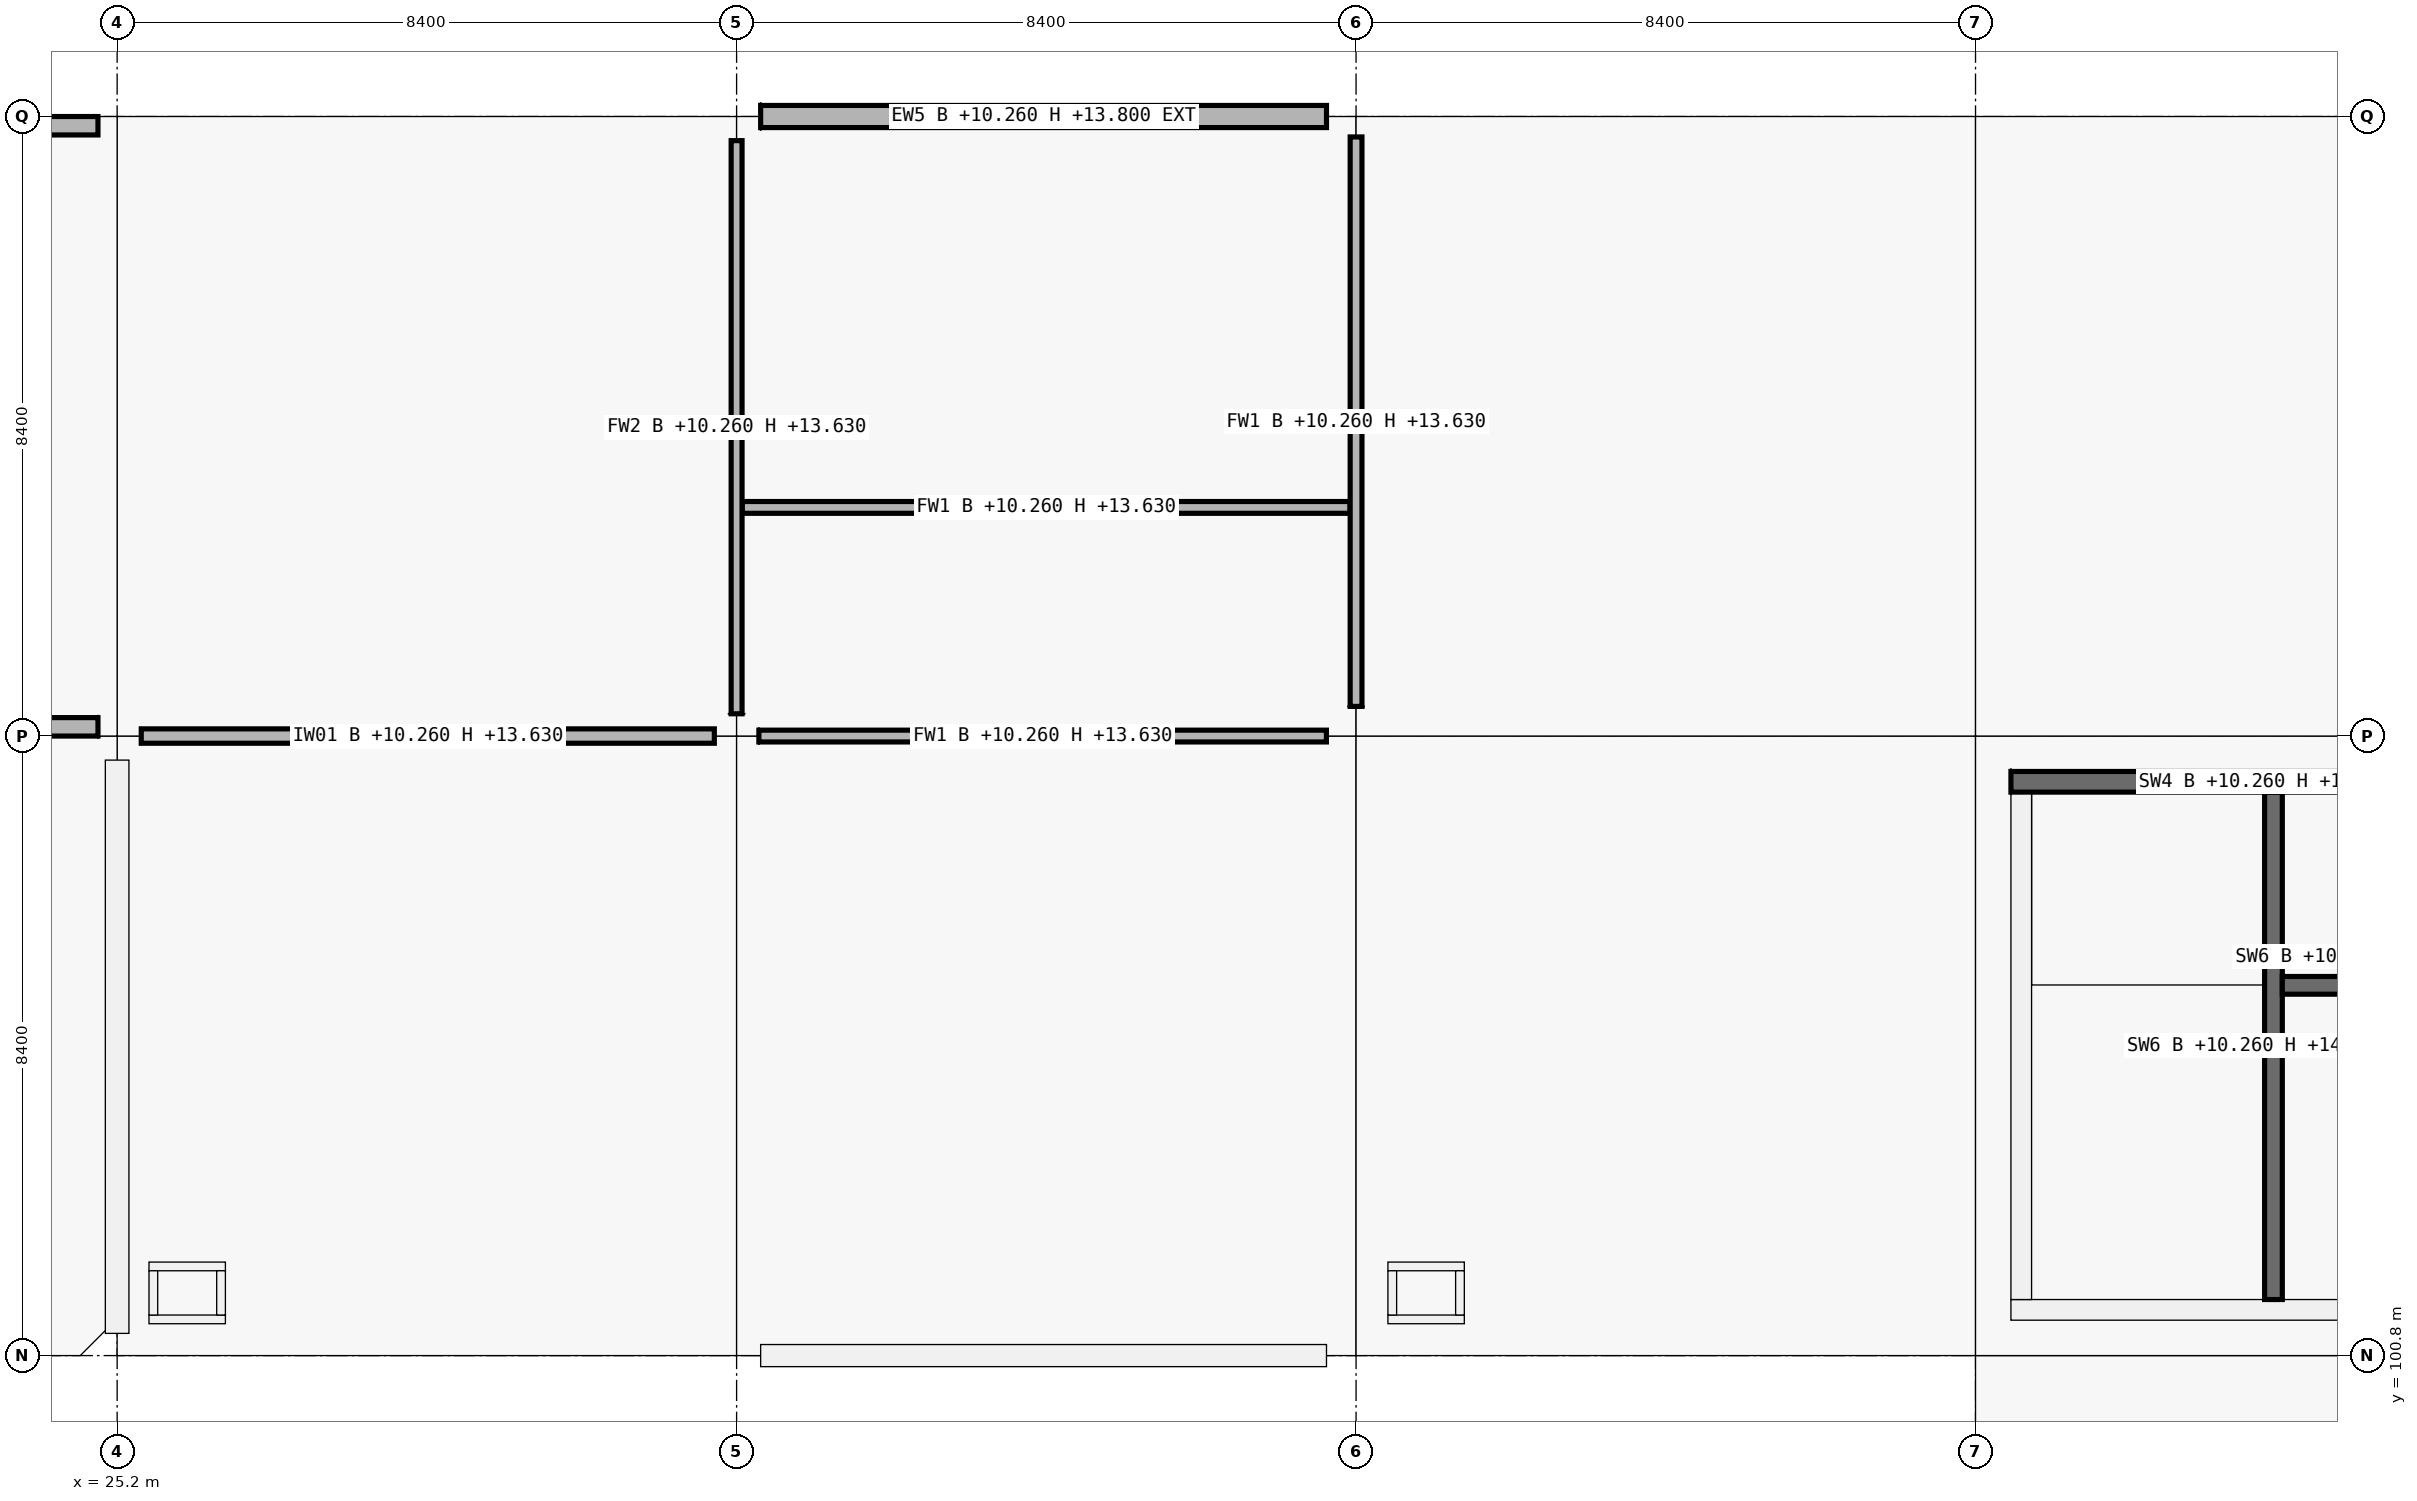
"""IFC4 building model, lengths in metres.
Left out: names, types, materials, properties, quantities, classifications, styles, units other than length and angle.
Written with IfcOpenShell. Run it as: python <this file> out.ifc"""

import sys

from ifc_helpers import new_model, si_unit, direction, frame, frame_2d, origin, origin_2d, place, context, subcontext, project, spatial, rectangle, extrude, element, fill, save


model = new_model("IFC4")
c1 = context("Model", 3, precision=1e-05, world=origin(), true_north=direction((0.0, 1.0)))
c2 = subcontext(c1, "Body", "Model", "MODEL_VIEW")
j1 = project(units=[si_unit("LENGTHUNIT", "METRE"), si_unit("PLANEANGLEUNIT", "RADIAN")], contexts=[c1])
p1 = place(None, origin())
s1 = spatial("IfcSite", under=j1, at=p1, CompositionType="ELEMENT")
p2 = place(p1, origin())
s2 = spatial("IfcBuilding", under=s1, at=p2, CompositionType="ELEMENT")
p3 = place(p2, frame((0.0, 0.0, 10.26)))
s3 = spatial("IfcBuildingStorey", under=s2, at=p3, CompositionType="ELEMENT", Elevation=10.26)
p4 = place(p3, frame((25.2, 100.8, 0.0), z_axis=(0.0, 0.0, 1.0), x_axis=(1.0, 0.0, 0.0)))
e1 = element("IfcColumn", 1, at=p4, inside=s3, PredefinedType="COLUMN", context=c2, shape_type="SweptSolid", body=[
    extrude(rectangle(XDim=0.6, YDim=0.6, at=origin_2d()), origin(), (0.0, 0.0, 1.0), 4.5),
])
p5 = place(p3, frame((25.2, 109.2, 0.0), z_axis=(0.0, 0.0, 1.0), x_axis=(1.0, 0.0, 0.0)))
e2 = element("IfcColumn", 2, at=p5, inside=s3, PredefinedType="COLUMN", context=c2, shape_type="SweptSolid", body=[
    extrude(rectangle(XDim=0.65, YDim=0.65, at=origin_2d()), origin(), (0.0, 0.0, 1.0), 4.5),
])
p6 = place(p3, frame((25.2, 117.6, 0.0), z_axis=(0.0, 0.0, 1.0), x_axis=(1.0, 0.0, 0.0)))
e3 = element("IfcColumn", 3, at=p6, inside=s3, PredefinedType="COLUMN", context=c2, shape_type="SweptSolid", body=[
    extrude(rectangle(XDim=0.6, YDim=0.6, at=origin_2d()), origin(), (0.0, 0.0, 1.0), 4.5),
])
p7 = place(p3, frame((33.6, 100.8, 0.0), z_axis=(0.0, 0.0, 1.0), x_axis=(1.0, 0.0, 0.0)))
e4 = element("IfcColumn", 4, at=p7, inside=s3, PredefinedType="COLUMN", context=c2, shape_type="SweptSolid", body=[
    extrude(rectangle(XDim=0.65, YDim=0.65, at=origin_2d()), origin(), (0.0, 0.0, 1.0), 4.5),
])
p8 = place(p3, frame((33.6, 109.2, 0.0), z_axis=(0.0, 0.0, 1.0), x_axis=(1.0, 0.0, 0.0)))
e5 = element("IfcColumn", 5, at=p8, inside=s3, PredefinedType="COLUMN", context=c2, shape_type="SweptSolid", body=[
    extrude(rectangle(XDim=0.6, YDim=0.6, at=origin_2d()), origin(), (0.0, 0.0, 1.0), 4.5),
])
p9 = place(p3, frame((33.6, 117.6, 0.0), z_axis=(0.0, 0.0, 1.0), x_axis=(1.0, 0.0, 0.0)))
e6 = element("IfcColumn", 6, at=p9, inside=s3, PredefinedType="COLUMN", context=c2, shape_type="SweptSolid", body=[
    extrude(rectangle(XDim=0.65, YDim=0.65, at=origin_2d()), origin(), (0.0, 0.0, 1.0), 4.5),
])
for number, where, z_axis, x_axis in (
    (7, (42.0, 100.8, 0.0), (0.0, 0.0, 1.0), (1.0, 0.0, 0.0)),
    (8, (42.0, 109.2, 0.0), (0.0, 0.0, 1.0), (1.0, 0.0, 0.0)),
):
    element("IfcColumn", number, at=place(p3, frame(where, z_axis=z_axis, x_axis=x_axis)), inside=s3, PredefinedType="COLUMN", context=c2, shape_type="SweptSolid", body=[
        extrude(rectangle(XDim=0.8, YDim=0.8, at=origin_2d()), origin(), (0.0, 0.0, 1.0), 4.5),
    ])
p10 = place(p3, frame((42.0, 117.6, 0.0), z_axis=(0.0, 0.0, 1.0), x_axis=(1.0, 0.0, 0.0)))
e9 = element("IfcColumn", 9, at=p10, inside=s3, PredefinedType="COLUMN", context=c2, shape_type="SweptSolid", body=[
    extrude(rectangle(XDim=0.8, YDim=0.55, at=origin_2d()), origin(), (0.0, 0.0, 1.0), 4.5),
])
for number, where, z_axis, x_axis in (
    (10, (50.4, 100.8, 0.0), (0.0, 0.0, 1.0), (1.0, 0.0, 0.0)),
    (11, (50.4, 109.2, 0.0), (0.0, 0.0, 1.0), (1.0, 0.0, 0.0)),
):
    element("IfcColumn", number, at=place(p3, frame(where, z_axis=z_axis, x_axis=x_axis)), inside=s3, PredefinedType="COLUMN", context=c2, shape_type="SweptSolid", body=[
        extrude(rectangle(XDim=0.85, YDim=0.85, at=origin_2d()), origin(), (0.0, 0.0, 1.0), 4.5),
    ])
p11 = place(p3, frame((50.4, 117.6, 0.0), z_axis=(0.0, 0.0, 1.0), x_axis=(1.0, 0.0, 0.0)))
e12 = element("IfcColumn", 12, at=p11, inside=s3, PredefinedType="COLUMN", context=c2, shape_type="SweptSolid", body=[
    extrude(rectangle(XDim=0.8, YDim=0.55, at=origin_2d()), origin(), (0.0, 0.0, 1.0), 4.5),
])
p12 = place(p3, frame((25.2, 101.101, 0.0), z_axis=(0.0, 0.0, 1.0), x_axis=(0.0, 1.0, 0.0)))
e13 = element("IfcWall", 13, at=p12, inside=s3, PredefinedType="SOLIDWALL", context=c2, shape_type="SweptSolid", body=[
    extrude(rectangle(XDim=7.773, YDim=0.32, at=frame_2d((3.886, 0.0))), origin(), (0.0, 0.0, 1.0), 3.54),
])
p13 = place(p12, frame((3.326, 0.0, 0.0)))
e14 = element("IfcOpeningElement", 14, at=p13, cuts=e13, PredefinedType="OPENING", context=c2, shape_type="SweptSolid", body=[
    extrude(rectangle(XDim=1.12, YDim=2.2, at=frame_2d((0.56, 1.1))), frame((0.0, 0.16, 0.0), z_axis=(0.0, -1.0, 0.0), x_axis=(1.0, 0.0, 0.0)), (0.0, 0.0, 1.0), 0.32),
])
p14 = place(p3, frame((41.599, 100.8, 0.0), z_axis=(0.0, 0.0, 1.0), x_axis=(-1.0, 0.0, 0.0)))
e15 = element("IfcWall", 15, at=p14, inside=s3, PredefinedType="SOLIDWALL", context=c2, shape_type="SweptSolid", body=[
    extrude(rectangle(XDim=7.673, YDim=0.3, at=frame_2d((3.836, 0.0))), origin(), (0.0, 0.0, 1.0), 3.54),
])
p15 = place(p14, frame((2.736, 0.0, 0.9)))
e16 = element("IfcOpeningElement", 16, at=p15, cuts=e15, PredefinedType="OPENING", context=c2, shape_type="SweptSolid", body=[
    extrude(rectangle(XDim=2.2, YDim=1.75, at=frame_2d((1.1, 0.875))), frame((0.0, 0.15, 0.0), z_axis=(0.0, -1.0, 0.0), x_axis=(1.0, 0.0, 0.0)), (0.0, 0.0, 1.0), 0.3),
])
p16 = place(p3, frame((33.926, 117.6, 0.0), z_axis=(0.0, 0.0, 1.0), x_axis=(1.0, 0.0, 0.0)))
e17 = element("IfcWall", 17, at=p16, inside=s3, PredefinedType="SOLIDWALL", context=c2, shape_type="SweptSolid", body=[
    extrude(rectangle(XDim=7.673, YDim=0.3, at=frame_2d((3.836, 0.0))), origin(), (0.0, 0.0, 1.0), 3.54),
])
p17 = place(p16, frame((2.437, 0.0, 0.9)))
e18 = element("IfcOpeningElement", 18, at=p17, cuts=e17, PredefinedType="OPENING", context=c2, shape_type="SweptSolid", body=[
    extrude(rectangle(XDim=2.8, YDim=1.75, at=frame_2d((1.4, 0.875))), frame((0.0, 0.15, 0.0), z_axis=(0.0, -1.0, 0.0), x_axis=(1.0, 0.0, 0.0)), (0.0, 0.0, 1.0), 0.3),
])
for number, where, z_axis, x_axis in (
    (19, (24.94, 109.325, 0.0), (0.0, 0.0, 1.0), (-1.0, 0.0, 0.0)),
    (20, (17.06, 117.475, 0.0), (0.0, 0.0, 1.0), (1.0, 0.0, 0.0)),
):
    element("IfcWall", number, at=place(p3, frame(where, z_axis=z_axis, x_axis=x_axis)), inside=s3, PredefinedType="PARAPET", context=c2, shape_type="SweptSolid", body=[
        extrude(rectangle(XDim=7.88, YDim=0.25, at=frame_2d((3.94, 0.0))), origin(), (0.0, 0.0, 1.0), 0.95),
    ])
p18 = place(p3, frame((58.32, 101.42, 0.0), z_axis=(0.0, 0.0, 1.0), x_axis=(-1.0, 0.0, 0.0)))
e21 = element("IfcWall", 21, at=p18, inside=s3, PredefinedType="SHEAR", context=c2, shape_type="SweptSolid", body=[
    extrude(rectangle(XDim=7.44, YDim=0.28, at=frame_2d((3.72, 0.0))), origin(), (0.0, 0.0, 1.0), 4.5),
])
p19 = place(p18, frame((1.28, 0.0, 0.0)))
e22 = element("IfcOpeningElement", 22, at=p19, cuts=e21, PredefinedType="OPENING", context=c2, shape_type="SweptSolid", body=[
    extrude(rectangle(XDim=1.5, YDim=2.15, at=frame_2d((0.75, 1.075))), frame((0.0, 0.14, 0.0), z_axis=(0.0, -1.0, 0.0), x_axis=(1.0, 0.0, 0.0)), (0.0, 0.0, 1.0), 0.28),
])
p20 = place(p3, frame((51.02, 101.56, 0.0), z_axis=(0.0, 0.0, 1.0), x_axis=(0.0, 1.0, 0.0)))
e23 = element("IfcWall", 23, at=p20, inside=s3, PredefinedType="SHEAR", context=c2, shape_type="SweptSolid", body=[
    extrude(rectangle(XDim=6.88, YDim=0.28, at=frame_2d((3.44, 0.0))), origin(), (0.0, 0.0, 1.0), 4.5),
])
p21 = place(p3, frame((50.88, 108.58, 0.0), z_axis=(0.0, 0.0, 1.0), x_axis=(1.0, 0.0, 0.0)))
e24 = element("IfcWall", 24, at=p21, inside=s3, PredefinedType="SHEAR", context=c2, shape_type="SweptSolid", body=[
    extrude(rectangle(XDim=7.44, YDim=0.28, at=frame_2d((3.72, 0.0))), origin(), (0.0, 0.0, 1.0), 4.5),
])
p22 = place(p3, frame((54.44, 101.56, 0.0), z_axis=(0.0, 0.0, 1.0), x_axis=(0.0, 1.0, 0.0)))
e25 = element("IfcWall", 25, at=p22, inside=s3, PredefinedType="SHEAR", context=c2, shape_type="SweptSolid", body=[
    extrude(rectangle(XDim=6.88, YDim=0.24, at=frame_2d((3.44, 0.0))), origin(), (0.0, 0.0, 1.0), 4.5),
])
p23 = place(p22, frame((0.12, 0.0, 0.0)))
e26 = element("IfcOpeningElement", 26, at=p23, cuts=e25, PredefinedType="OPENING", context=c2, shape_type="SweptSolid", body=[
    extrude(rectangle(XDim=1.0, YDim=2.15, at=frame_2d((0.5, 1.075))), frame((0.0, 0.12, 0.0), z_axis=(0.0, -1.0, 0.0), x_axis=(1.0, 0.0, 0.0)), (0.0, 0.0, 1.0), 0.24),
])
p24 = place(p3, frame((54.56, 105.82, 0.0), z_axis=(0.0, 0.0, 1.0), x_axis=(1.0, 0.0, 0.0)))
e27 = element("IfcWall", 27, at=p24, inside=s3, PredefinedType="SHEAR", context=c2, shape_type="SweptSolid", body=[
    extrude(rectangle(XDim=3.48, YDim=0.24, at=frame_2d((1.74, 0.0))), origin(), (0.0, 0.0, 1.0), 4.5),
])
p25 = place(p24, frame((1.14, 0.0, 0.0)))
e28 = element("IfcOpeningElement", 28, at=p25, cuts=e27, PredefinedType="OPENING", context=c2, shape_type="SweptSolid", body=[
    extrude(rectangle(XDim=1.2, YDim=2.2, at=frame_2d((0.6, 1.1))), frame((0.0, 0.12, 0.0), z_axis=(0.0, -1.0, 0.0), x_axis=(1.0, 0.0, 0.0)), (0.0, 0.0, 1.0), 0.24),
])
for number, where, z_axis, x_axis in (
    (29, (25.632, 101.291, 0.0), (0.0, 0.0, 1.0), (1.0, 0.0, 0.0)),
    (30, (25.632, 102.009, 0.0), (0.0, 0.0, 1.0), (1.0, 0.0, 0.0)),
):
    element("IfcWall", number, at=place(p3, frame(where, z_axis=z_axis, x_axis=x_axis)), inside=s3, PredefinedType="PARTITIONING", context=c2, shape_type="SweptSolid", body=[
        extrude(rectangle(XDim=1.036, YDim=0.118, at=frame_2d((0.518, 0.0))), origin(), (0.0, 0.0, 1.0), 3.53),
    ])
for number, where, z_axis, x_axis in (
    (31, (25.691, 101.35, 0.0), (0.0, 0.0, 1.0), (0.0, 1.0, 0.0)),
    (32, (26.609, 101.35, 0.0), (0.0, 0.0, 1.0), (0.0, 1.0, 0.0)),
):
    element("IfcWall", number, at=place(p3, frame(where, z_axis=z_axis, x_axis=x_axis)), inside=s3, PredefinedType="PARTITIONING", context=c2, shape_type="SweptSolid", body=[
        extrude(rectangle(XDim=0.6, YDim=0.118, at=frame_2d((0.3, 0.0))), origin(), (0.0, 0.0, 1.0), 3.53),
    ])
for number, where, z_axis, x_axis in (
    (33, (42.432, 101.291, 0.0), (0.0, 0.0, 1.0), (1.0, 0.0, 0.0)),
    (34, (42.432, 102.009, 0.0), (0.0, 0.0, 1.0), (1.0, 0.0, 0.0)),
):
    element("IfcWall", number, at=place(p3, frame(where, z_axis=z_axis, x_axis=x_axis)), inside=s3, PredefinedType="PARTITIONING", context=c2, shape_type="SweptSolid", body=[
        extrude(rectangle(XDim=1.036, YDim=0.118, at=frame_2d((0.518, 0.0))), origin(), (0.0, 0.0, 1.0), 3.53),
    ])
for number, where, z_axis, x_axis in (
    (35, (42.491, 101.35, 0.0), (0.0, 0.0, 1.0), (0.0, 1.0, 0.0)),
    (36, (43.409, 101.35, 0.0), (0.0, 0.0, 1.0), (0.0, 1.0, 0.0)),
):
    element("IfcWall", number, at=place(p3, frame(where, z_axis=z_axis, x_axis=x_axis)), inside=s3, PredefinedType="PARTITIONING", context=c2, shape_type="SweptSolid", body=[
        extrude(rectangle(XDim=0.6, YDim=0.118, at=frame_2d((0.3, 0.0))), origin(), (0.0, 0.0, 1.0), 3.53),
    ])
p26 = place(p3, frame((25.527, 109.2, 0.0), z_axis=(0.0, 0.0, 1.0), x_axis=(1.0, 0.0, 0.0)))
e37 = element("IfcWall", 37, at=p26, inside=s3, PredefinedType="PARTITIONING", context=c2, shape_type="SweptSolid", body=[
    extrude(rectangle(XDim=7.771, YDim=0.195, at=frame_2d((3.885, 0.0))), origin(), (0.0, 0.0, 1.0), 3.37),
])
p27 = place(p26, frame((3.375, 0.0, 0.0)))
e38 = element("IfcOpeningElement", 38, at=p27, cuts=e37, PredefinedType="OPENING", context=c2, shape_type="SweptSolid", body=[
    extrude(rectangle(XDim=1.02, YDim=2.2, at=frame_2d((0.51, 1.1))), frame((0.0, 0.098, 0.0), z_axis=(0.0, -1.0, 0.0), x_axis=(1.0, 0.0, 0.0)), (0.0, 0.0, 1.0), 0.195),
])
p28 = place(p3, frame((33.902, 109.2, 0.0), z_axis=(0.0, 0.0, 1.0), x_axis=(1.0, 0.0, 0.0)))
e39 = element("IfcWall", 39, at=p28, inside=s3, PredefinedType="PARTITIONING", context=c2, shape_type="SweptSolid", body=[
    extrude(rectangle(XDim=7.696, YDim=0.16, at=frame_2d((3.848, 0.0))), origin(), (0.0, 0.0, 1.0), 3.37),
])
p29 = place(p3, frame((33.6, 109.502, 0.0), z_axis=(0.0, 0.0, 1.0), x_axis=(0.0, 1.0, 0.0)))
e40 = element("IfcWall", 40, at=p29, inside=s3, PredefinedType="PARTITIONING", context=c2, shape_type="SweptSolid", body=[
    extrude(rectangle(XDim=7.771, YDim=0.148, at=frame_2d((3.885, 0.0))), origin(), (0.0, 0.0, 1.0), 3.37),
])
p30 = place(p3, frame((42.0, 109.602, 0.0), z_axis=(0.0, 0.0, 1.0), x_axis=(0.0, 1.0, 0.0)))
e41 = element("IfcWall", 41, at=p30, inside=s3, PredefinedType="PARTITIONING", context=c2, shape_type="SweptSolid", body=[
    extrude(rectangle(XDim=7.721, YDim=0.16, at=frame_2d((3.86, 0.0))), origin(), (0.0, 0.0, 1.0), 3.37),
])
p31 = place(p30, frame((0.763, 0.0, 0.0)))
e42 = element("IfcOpeningElement", 42, at=p31, cuts=e41, PredefinedType="OPENING", context=c2, shape_type="SweptSolid", body=[
    extrude(rectangle(XDim=1.05, YDim=2.15, at=frame_2d((0.525, 1.075))), frame((0.0, 0.08, 0.0), z_axis=(0.0, -1.0, 0.0), x_axis=(1.0, 0.0, 0.0)), (0.0, 0.0, 1.0), 0.16),
])
p32 = place(p30, frame((4.708, 0.0, 0.0)))
e43 = element("IfcOpeningElement", 43, at=p32, cuts=e41, PredefinedType="OPENING", context=c2, shape_type="SweptSolid", body=[
    extrude(rectangle(XDim=1.0, YDim=2.15, at=frame_2d((0.5, 1.075))), frame((0.0, 0.08, 0.0), z_axis=(0.0, -1.0, 0.0), x_axis=(1.0, 0.0, 0.0)), (0.0, 0.0, 1.0), 0.16),
])
p33 = place(p3, frame((33.676, 112.3, 0.0), z_axis=(0.0, 0.0, 1.0), x_axis=(1.0, 0.0, 0.0)))
e44 = element("IfcWall", 44, at=p33, inside=s3, PredefinedType="PARTITIONING", context=c2, shape_type="SweptSolid", body=[
    extrude(rectangle(XDim=8.242, YDim=0.16, at=frame_2d((4.121, 0.0))), origin(), (0.0, 0.0, 1.0), 3.37),
])
p34 = place(p13, origin())
e45 = element("IfcDoor", 45, at=p34, inside=s3, OperationType="SINGLE_SWING_RIGHT", PredefinedType="DOOR", context=c2, shape_type="SweptSolid", body=[
    extrude(rectangle(XDim=1.12, YDim=2.2, at=frame_2d((0.56, 1.1))), frame((0.0, 0.025, 0.0), z_axis=(0.0, -1.0, 0.0), x_axis=(1.0, 0.0, 0.0)), (0.0, 0.0, 1.0), 0.05),
])
fill(e14, e45)
p35 = place(p15, origin())
e46 = element("IfcWindow", 46, at=p35, inside=s3, PartitioningType="SINGLE_PANEL", PredefinedType="WINDOW", context=c2, shape_type="SweptSolid", body=[
    extrude(rectangle(XDim=2.2, YDim=1.75, at=frame_2d((1.1, 0.875))), frame((0.0, 0.03, 0.0), z_axis=(0.0, -1.0, 0.0), x_axis=(1.0, 0.0, 0.0)), (0.0, 0.0, 1.0), 0.06),
])
fill(e16, e46)
p36 = place(p17, origin())
e47 = element("IfcWindow", 47, at=p36, inside=s3, PartitioningType="SINGLE_PANEL", PredefinedType="WINDOW", context=c2, shape_type="SweptSolid", body=[
    extrude(rectangle(XDim=2.8, YDim=1.75, at=frame_2d((1.4, 0.875))), frame((0.0, 0.03, 0.0), z_axis=(0.0, -1.0, 0.0), x_axis=(1.0, 0.0, 0.0)), (0.0, 0.0, 1.0), 0.06),
])
fill(e18, e47)
p37 = place(p23, origin())
e48 = element("IfcDoor", 48, at=p37, inside=s3, OperationType="SINGLE_SWING_RIGHT", PredefinedType="DOOR", context=c2, shape_type="SweptSolid", body=[
    extrude(rectangle(XDim=1.0, YDim=2.15, at=frame_2d((0.5, 1.075))), frame((0.0, 0.025, 0.0), z_axis=(0.0, -1.0, 0.0), x_axis=(1.0, 0.0, 0.0)), (0.0, 0.0, 1.0), 0.05),
])
fill(e26, e48)
p38 = place(p31, origin())
e49 = element("IfcDoor", 49, at=p38, inside=s3, OperationType="SINGLE_SWING_RIGHT", PredefinedType="DOOR", context=c2, shape_type="SweptSolid", body=[
    extrude(rectangle(XDim=1.05, YDim=2.15, at=frame_2d((0.525, 1.075))), frame((0.0, 0.025, 0.0), z_axis=(0.0, -1.0, 0.0), x_axis=(1.0, 0.0, 0.0)), (0.0, 0.0, 1.0), 0.05),
])
fill(e42, e49)
p39 = place(p32, origin())
e50 = element("IfcDoor", 50, at=p39, inside=s3, OperationType="SINGLE_SWING_LEFT", PredefinedType="DOOR", context=c2, shape_type="SweptSolid", body=[
    extrude(rectangle(XDim=1.0, YDim=2.15, at=frame_2d((0.5, 1.075))), frame((0.0, 0.025, 0.0), z_axis=(0.0, -1.0, 0.0), x_axis=(1.0, 0.0, 0.0)), (0.0, 0.0, 1.0), 0.05),
])
fill(e43, e50)
p40 = place(p27, origin())
e51 = element("IfcDoor", 51, at=p40, inside=s3, OperationType="SINGLE_SWING_RIGHT", PredefinedType="DOOR", context=c2, shape_type="SweptSolid", body=[
    extrude(rectangle(XDim=1.02, YDim=2.2, at=frame_2d((0.51, 1.1))), frame((0.0, 0.025, 0.0), z_axis=(0.0, -1.0, 0.0), x_axis=(1.0, 0.0, 0.0)), (0.0, 0.0, 1.0), 0.05),
])
fill(e38, e51)
save(model, sys.argv[1])
